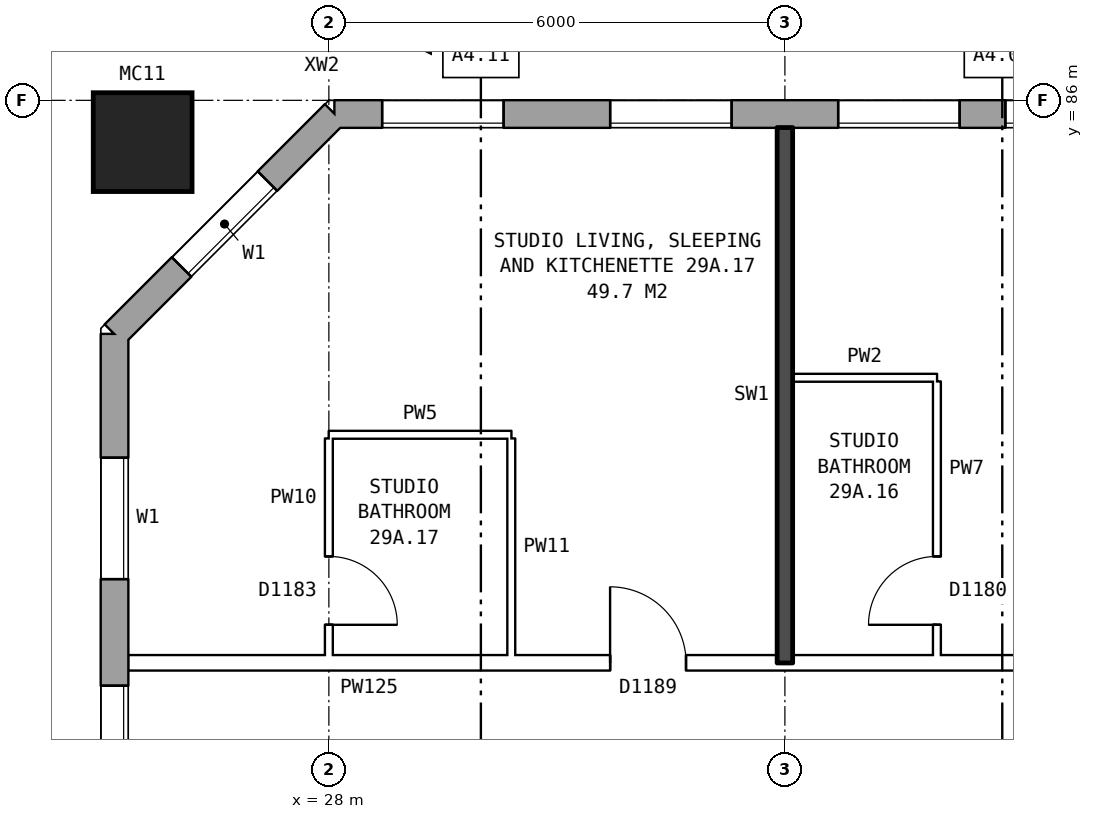
"""IFC4 building model, lengths in metres.
Left out: names, types, materials, properties, quantities, classifications, styles, units other than length and angle.
Written with IfcOpenShell. Run it as: python <this file> out.ifc"""

import sys

from ifc_helpers import new_model, si_unit, direction, frame, frame_2d, origin, origin_2d, place, context, subcontext, project, spatial, rectangle, hollow_rectangle, extrude, element, fill, save


model = new_model("IFC4")
c1 = context("Model", 3, precision=1e-05, world=origin(), true_north=direction((0.0, 1.0)))
c2 = subcontext(c1, "Body", "Model", "MODEL_VIEW")
j1 = project(units=[si_unit("LENGTHUNIT", "METRE"), si_unit("PLANEANGLEUNIT", "RADIAN")], contexts=[c1])
p1 = place(None, origin())
s1 = spatial("IfcSite", under=j1, at=p1, CompositionType="ELEMENT")
p2 = place(p1, origin())
s2 = spatial("IfcBuilding", under=s1, at=p2, CompositionType="ELEMENT")
p3 = place(p2, frame((0.0, 0.0, 105.7)))
s3 = spatial("IfcBuildingStorey", under=s2, at=p3, CompositionType="ELEMENT", Elevation=105.7)
p4 = place(p3, frame((25.55, 85.45, 0.0), z_axis=(0.0, 0.0, 1.0), x_axis=(1.0, 0.0, 0.0)))
e1 = element("IfcColumn", 1, at=p4, inside=s3, PredefinedType="COLUMN", context=c2, shape_type="SweptSolid", body=[
    extrude(hollow_rectangle(XDim=1.3, YDim=1.3, WallThickness=0.07, at=origin_2d()), origin(), (0.0, 0.0, 1.0), 3.1),
])
p5 = place(p3, frame((72.925, 85.82, 0.0), z_axis=(0.0, 0.0, 1.0), x_axis=(-1.0, 0.0, 0.0)))
e2 = element("IfcWall", 2, at=p5, inside=s3, PredefinedType="STANDARD", context=c2, shape_type="SweptSolid", body=[
    extrude(rectangle(XDim=44.851, YDim=0.36, at=frame_2d((22.425, 0.0))), origin(), (0.0, 0.0, 1.0), 2.85),
])
p6 = place(p5, frame((0.625, 0.0, 0.8)))
e3 = element("IfcOpeningElement", 3, at=p6, cuts=e2, PredefinedType="OPENING", context=c2, shape_type="SweptSolid", body=[
    extrude(rectangle(XDim=1.6, YDim=1.8, at=frame_2d((0.8, 0.9))), frame((0.0, 0.19, 0.0), z_axis=(0.0, -1.0, 0.0), x_axis=(1.0, 0.0, 0.0)), (0.0, 0.0, 1.0), 0.38),
])
p7 = place(p5, frame((3.625, 0.0, 0.8)))
e4 = element("IfcOpeningElement", 4, at=p7, cuts=e2, PredefinedType="OPENING", context=c2, shape_type="SweptSolid", body=[
    extrude(rectangle(XDim=1.6, YDim=1.8, at=frame_2d((0.8, 0.9))), frame((0.0, 0.19, 0.0), z_axis=(0.0, -1.0, 0.0), x_axis=(1.0, 0.0, 0.0)), (0.0, 0.0, 1.0), 0.38),
])
p8 = place(p5, frame((6.625, 0.0, 0.8)))
e5 = element("IfcOpeningElement", 5, at=p8, cuts=e2, PredefinedType="OPENING", context=c2, shape_type="SweptSolid", body=[
    extrude(rectangle(XDim=1.6, YDim=1.8, at=frame_2d((0.8, 0.9))), frame((0.0, 0.19, 0.0), z_axis=(0.0, -1.0, 0.0), x_axis=(1.0, 0.0, 0.0)), (0.0, 0.0, 1.0), 0.38),
])
p9 = place(p5, frame((9.125, 0.0, 0.8)))
e6 = element("IfcOpeningElement", 6, at=p9, cuts=e2, PredefinedType="OPENING", context=c2, shape_type="SweptSolid", body=[
    extrude(rectangle(XDim=1.6, YDim=1.8, at=frame_2d((0.8, 0.9))), frame((0.0, 0.19, 0.0), z_axis=(0.0, -1.0, 0.0), x_axis=(1.0, 0.0, 0.0)), (0.0, 0.0, 1.0), 0.38),
])
p10 = place(p5, frame((12.825, 0.0, 0.55)))
e7 = element("IfcOpeningElement", 7, at=p10, cuts=e2, PredefinedType="OPENING", context=c2, shape_type="SweptSolid", body=[
    extrude(rectangle(XDim=0.6, YDim=0.9, at=frame_2d((0.3, 0.45))), frame((0.0, 0.19, 0.0), z_axis=(0.0, -1.0, 0.0), x_axis=(1.0, 0.0, 0.0)), (0.0, 0.0, 1.0), 0.38),
])
p11 = place(p5, frame((15.625, 0.0, 0.8)))
e8 = element("IfcOpeningElement", 8, at=p11, cuts=e2, PredefinedType="OPENING", context=c2, shape_type="SweptSolid", body=[
    extrude(rectangle(XDim=1.6, YDim=1.8, at=frame_2d((0.8, 0.9))), frame((0.0, 0.19, 0.0), z_axis=(0.0, -1.0, 0.0), x_axis=(1.0, 0.0, 0.0)), (0.0, 0.0, 1.0), 0.38),
])
p12 = place(p5, frame((18.625, 0.0, 0.8)))
e9 = element("IfcOpeningElement", 9, at=p12, cuts=e2, PredefinedType="OPENING", context=c2, shape_type="SweptSolid", body=[
    extrude(rectangle(XDim=1.6, YDim=1.8, at=frame_2d((0.8, 0.9))), frame((0.0, 0.19, 0.0), z_axis=(0.0, -1.0, 0.0), x_axis=(1.0, 0.0, 0.0)), (0.0, 0.0, 1.0), 0.38),
])
p13 = place(p5, frame((21.625, 0.0, 0.8)))
e10 = element("IfcOpeningElement", 10, at=p13, cuts=e2, PredefinedType="OPENING", context=c2, shape_type="SweptSolid", body=[
    extrude(rectangle(XDim=1.6, YDim=1.8, at=frame_2d((0.8, 0.9))), frame((0.0, 0.19, 0.0), z_axis=(0.0, -1.0, 0.0), x_axis=(1.0, 0.0, 0.0)), (0.0, 0.0, 1.0), 0.38),
])
p14 = place(p5, frame((24.625, 0.0, 0.8)))
e11 = element("IfcOpeningElement", 11, at=p14, cuts=e2, PredefinedType="OPENING", context=c2, shape_type="SweptSolid", body=[
    extrude(rectangle(XDim=1.6, YDim=1.8, at=frame_2d((0.8, 0.9))), frame((0.0, 0.19, 0.0), z_axis=(0.0, -1.0, 0.0), x_axis=(1.0, 0.0, 0.0)), (0.0, 0.0, 1.0), 0.38),
])
p15 = place(p5, frame((27.625, 0.0, 0.8)))
e12 = element("IfcOpeningElement", 12, at=p15, cuts=e2, PredefinedType="OPENING", context=c2, shape_type="SweptSolid", body=[
    extrude(rectangle(XDim=1.6, YDim=1.8, at=frame_2d((0.8, 0.9))), frame((0.0, 0.19, 0.0), z_axis=(0.0, -1.0, 0.0), x_axis=(1.0, 0.0, 0.0)), (0.0, 0.0, 1.0), 0.38),
])
p16 = place(p5, frame((29.525, 0.0, 0.8)))
e13 = element("IfcOpeningElement", 13, at=p16, cuts=e2, PredefinedType="OPENING", context=c2, shape_type="SweptSolid", body=[
    extrude(rectangle(XDim=0.8, YDim=1.8, at=frame_2d((0.4, 0.9))), frame((0.0, 0.19, 0.0), z_axis=(0.0, -1.0, 0.0), x_axis=(1.0, 0.0, 0.0)), (0.0, 0.0, 1.0), 0.38),
])
p17 = place(p5, frame((33.325, 0.0, 1.4)))
e14 = element("IfcOpeningElement", 14, at=p17, cuts=e2, PredefinedType="OPENING", context=c2, shape_type="SweptSolid", body=[
    extrude(rectangle(XDim=1.0, YDim=1.2, at=frame_2d((0.5, 0.6))), frame((0.0, 0.19, 0.0), z_axis=(0.0, -1.0, 0.0), x_axis=(1.0, 0.0, 0.0)), (0.0, 0.0, 1.0), 0.38),
])
p18 = place(p5, frame((36.625, 0.0, 0.8)))
e15 = element("IfcOpeningElement", 15, at=p18, cuts=e2, PredefinedType="OPENING", context=c2, shape_type="SweptSolid", body=[
    extrude(rectangle(XDim=1.6, YDim=1.8, at=frame_2d((0.8, 0.9))), frame((0.0, 0.19, 0.0), z_axis=(0.0, -1.0, 0.0), x_axis=(1.0, 0.0, 0.0)), (0.0, 0.0, 1.0), 0.38),
])
p19 = place(p5, frame((39.625, 0.0, 0.8)))
e16 = element("IfcOpeningElement", 16, at=p19, cuts=e2, PredefinedType="OPENING", context=c2, shape_type="SweptSolid", body=[
    extrude(rectangle(XDim=1.6, YDim=1.8, at=frame_2d((0.8, 0.9))), frame((0.0, 0.19, 0.0), z_axis=(0.0, -1.0, 0.0), x_axis=(1.0, 0.0, 0.0)), (0.0, 0.0, 1.0), 0.38),
])
p20 = place(p5, frame((42.625, 0.0, 0.8)))
e17 = element("IfcOpeningElement", 17, at=p20, cuts=e2, PredefinedType="OPENING", context=c2, shape_type="SweptSolid", body=[
    extrude(rectangle(XDim=1.6, YDim=1.8, at=frame_2d((0.8, 0.9))), frame((0.0, 0.19, 0.0), z_axis=(0.0, -1.0, 0.0), x_axis=(1.0, 0.0, 0.0)), (0.0, 0.0, 1.0), 0.38),
])
p21 = place(p5, frame((11.025, 0.0, 1.5)))
e18 = element("IfcOpeningElement", 18, at=p21, cuts=e2, PredefinedType="OPENING", context=c2, shape_type="SweptSolid", body=[
    extrude(rectangle(XDim=0.6, YDim=0.9, at=frame_2d((0.3, 0.45))), frame((0.0, 0.19, 0.0), z_axis=(0.0, -1.0, 0.0), x_axis=(1.0, 0.0, 0.0)), (0.0, 0.0, 1.0), 0.38),
])
p22 = place(p5, frame((13.725, 0.0, 0.55)))
e19 = element("IfcOpeningElement", 19, at=p22, cuts=e2, PredefinedType="OPENING", context=c2, shape_type="SweptSolid", body=[
    extrude(rectangle(XDim=1.0, YDim=1.5, at=frame_2d((0.5, 0.75))), frame((0.0, 0.19, 0.0), z_axis=(0.0, -1.0, 0.0), x_axis=(1.0, 0.0, 0.0)), (0.0, 0.0, 1.0), 0.38),
])
p23 = place(p5, frame((30.625, 0.0, 0.8)))
e20 = element("IfcOpeningElement", 20, at=p23, cuts=e2, PredefinedType="OPENING", context=c2, shape_type="SweptSolid", body=[
    extrude(rectangle(XDim=1.0, YDim=0.9, at=frame_2d((0.5, 0.45))), frame((0.0, 0.19, 0.0), z_axis=(0.0, -1.0, 0.0), x_axis=(1.0, 0.0, 0.0)), (0.0, 0.0, 1.0), 0.38),
])
p24 = place(p5, frame((34.625, 0.0, 0.8)))
e21 = element("IfcOpeningElement", 21, at=p24, cuts=e2, PredefinedType="OPENING", context=c2, shape_type="SweptSolid", body=[
    extrude(rectangle(XDim=1.4, YDim=1.8, at=frame_2d((0.7, 0.9))), frame((0.0, 0.19, 0.0), z_axis=(0.0, -1.0, 0.0), x_axis=(1.0, 0.0, 0.0)), (0.0, 0.0, 1.0), 0.38),
])
p25 = place(p3, frame((28.075, 85.82, 0.0), z_axis=(0.0, 0.0, 1.0), x_axis=(-0.707106781187, -0.707106781187, 0.0)))
e22 = element("IfcWall", 22, at=p25, inside=s3, PredefinedType="STANDARD", context=c2, shape_type="SweptSolid", body=[
    extrude(rectangle(XDim=4.094, YDim=0.36, at=frame_2d((2.047, 0.0))), origin(), (0.0, 0.0, 1.0), 2.85),
])
p26 = place(p25, frame((1.247, 0.0, 0.8)))
e23 = element("IfcOpeningElement", 23, at=p26, cuts=e22, PredefinedType="OPENING", context=c2, shape_type="SweptSolid", body=[
    extrude(rectangle(XDim=1.6, YDim=1.8, at=frame_2d((0.8, 0.9))), frame((0.0, 0.19, 0.0), z_axis=(0.0, -1.0, 0.0), x_axis=(1.0, 0.0, 0.0)), (0.0, 0.0, 1.0), 0.38),
])
p27 = place(p3, frame((25.18, 82.925, 0.0), z_axis=(0.0, 0.0, 1.0), x_axis=(0.0, -1.0, 0.0)))
e24 = element("IfcWall", 24, at=p27, inside=s3, PredefinedType="STANDARD", context=c2, shape_type="SweptSolid", body=[
    extrude(rectangle(XDim=25.851, YDim=0.36, at=frame_2d((12.925, 0.0))), origin(), (0.0, 0.0, 1.0), 2.85),
])
p28 = place(p27, frame((1.625, 0.0, 0.8)))
e25 = element("IfcOpeningElement", 25, at=p28, cuts=e24, PredefinedType="OPENING", context=c2, shape_type="SweptSolid", body=[
    extrude(rectangle(XDim=1.6, YDim=1.8, at=frame_2d((0.8, 0.9))), frame((0.0, 0.19, 0.0), z_axis=(0.0, -1.0, 0.0), x_axis=(1.0, 0.0, 0.0)), (0.0, 0.0, 1.0), 0.38),
])
p29 = place(p27, frame((4.625, 0.0, 0.8)))
e26 = element("IfcOpeningElement", 26, at=p29, cuts=e24, PredefinedType="OPENING", context=c2, shape_type="SweptSolid", body=[
    extrude(rectangle(XDim=1.6, YDim=1.8, at=frame_2d((0.8, 0.9))), frame((0.0, 0.19, 0.0), z_axis=(0.0, -1.0, 0.0), x_axis=(1.0, 0.0, 0.0)), (0.0, 0.0, 1.0), 0.38),
])
p30 = place(p27, frame((6.525, 0.0, 0.8)))
e27 = element("IfcOpeningElement", 27, at=p30, cuts=e24, PredefinedType="OPENING", context=c2, shape_type="SweptSolid", body=[
    extrude(rectangle(XDim=1.6, YDim=1.5, at=frame_2d((0.8, 0.75))), frame((0.0, 0.19, 0.0), z_axis=(0.0, -1.0, 0.0), x_axis=(1.0, 0.0, 0.0)), (0.0, 0.0, 1.0), 0.38),
])
p31 = place(p27, frame((8.425, 0.0, 0.8)))
e28 = element("IfcOpeningElement", 28, at=p31, cuts=e24, PredefinedType="OPENING", context=c2, shape_type="SweptSolid", body=[
    extrude(rectangle(XDim=0.6, YDim=0.9, at=frame_2d((0.3, 0.45))), frame((0.0, 0.19, 0.0), z_axis=(0.0, -1.0, 0.0), x_axis=(1.0, 0.0, 0.0)), (0.0, 0.0, 1.0), 0.38),
])
p32 = place(p27, frame((10.275, 0.0, 1.7)))
e29 = element("IfcOpeningElement", 29, at=p32, cuts=e24, PredefinedType="OPENING", context=c2, shape_type="SweptSolid", body=[
    extrude(rectangle(XDim=0.8, YDim=0.9, at=frame_2d((0.4, 0.45))), frame((0.0, 0.19, 0.0), z_axis=(0.0, -1.0, 0.0), x_axis=(1.0, 0.0, 0.0)), (0.0, 0.0, 1.0), 0.38),
])
p33 = place(p27, frame((11.375, 0.0, 1.1)))
e30 = element("IfcOpeningElement", 30, at=p33, cuts=e24, PredefinedType="OPENING", context=c2, shape_type="SweptSolid", body=[
    extrude(rectangle(XDim=0.8, YDim=1.5, at=frame_2d((0.4, 0.75))), frame((0.0, 0.19, 0.0), z_axis=(0.0, -1.0, 0.0), x_axis=(1.0, 0.0, 0.0)), (0.0, 0.0, 1.0), 0.38),
])
p34 = place(p27, frame((19.625, 0.0, 0.8)))
e31 = element("IfcOpeningElement", 31, at=p34, cuts=e24, PredefinedType="OPENING", context=c2, shape_type="SweptSolid", body=[
    extrude(rectangle(XDim=1.6, YDim=1.8, at=frame_2d((0.8, 0.9))), frame((0.0, 0.19, 0.0), z_axis=(0.0, -1.0, 0.0), x_axis=(1.0, 0.0, 0.0)), (0.0, 0.0, 1.0), 0.38),
])
p35 = place(p27, frame((22.625, 0.0, 0.8)))
e32 = element("IfcOpeningElement", 32, at=p35, cuts=e24, PredefinedType="OPENING", context=c2, shape_type="SweptSolid", body=[
    extrude(rectangle(XDim=1.6, YDim=1.8, at=frame_2d((0.8, 0.9))), frame((0.0, 0.19, 0.0), z_axis=(0.0, -1.0, 0.0), x_axis=(1.0, 0.0, 0.0)), (0.0, 0.0, 1.0), 0.38),
])
p36 = place(p27, frame((12.475, 0.0, 0.8)))
e33 = element("IfcOpeningElement", 33, at=p36, cuts=e24, PredefinedType="OPENING", context=c2, shape_type="SweptSolid", body=[
    extrude(rectangle(XDim=1.6, YDim=1.8, at=frame_2d((0.8, 0.9))), frame((0.0, 0.19, 0.0), z_axis=(0.0, -1.0, 0.0), x_axis=(1.0, 0.0, 0.0)), (0.0, 0.0, 1.0), 0.38),
])
p37 = place(p27, frame((14.375, 0.0, 1.7)))
e34 = element("IfcOpeningElement", 34, at=p37, cuts=e24, PredefinedType="OPENING", context=c2, shape_type="SweptSolid", body=[
    extrude(rectangle(XDim=1.2, YDim=0.9, at=frame_2d((0.6, 0.45))), frame((0.0, 0.19, 0.0), z_axis=(0.0, -1.0, 0.0), x_axis=(1.0, 0.0, 0.0)), (0.0, 0.0, 1.0), 0.38),
])
p38 = place(p27, frame((16.725, 0.0, 0.8)))
e35 = element("IfcOpeningElement", 35, at=p38, cuts=e24, PredefinedType="OPENING", context=c2, shape_type="SweptSolid", body=[
    extrude(rectangle(XDim=0.6, YDim=0.9, at=frame_2d((0.3, 0.45))), frame((0.0, 0.19, 0.0), z_axis=(0.0, -1.0, 0.0), x_axis=(1.0, 0.0, 0.0)), (0.0, 0.0, 1.0), 0.38),
])
p39 = place(p27, frame((17.725, 0.0, 0.8)))
e36 = element("IfcOpeningElement", 36, at=p39, cuts=e24, PredefinedType="OPENING", context=c2, shape_type="SweptSolid", body=[
    extrude(rectangle(XDim=1.6, YDim=1.5, at=frame_2d((0.8, 0.75))), frame((0.0, 0.19, 0.0), z_axis=(0.0, -1.0, 0.0), x_axis=(1.0, 0.0, 0.0)), (0.0, 0.0, 1.0), 0.38),
])
p40 = place(p3, frame((25.36, 78.6, 0.0), z_axis=(0.0, 0.0, 1.0), x_axis=(1.0, 0.0, 0.0)))
e37 = element("IfcWall", 37, at=p40, inside=s3, PredefinedType="PARTITIONING", context=c2, shape_type="SweptSolid", body=[
    extrude(rectangle(XDim=20.54, YDim=0.2, at=frame_2d((10.27, 0.0))), origin(), (0.0, 0.0, 1.0), 2.85),
])
p41 = place(p40, frame((18.09, 0.0, 0.0)))
e38 = element("IfcOpeningElement", 38, at=p41, cuts=e37, PredefinedType="OPENING", context=c2, shape_type="SweptSolid", body=[
    extrude(rectangle(XDim=1.0, YDim=2.1, at=frame_2d((0.5, 1.05))), frame((0.0, 0.11, 0.0), z_axis=(0.0, -1.0, 0.0), x_axis=(1.0, 0.0, 0.0)), (0.0, 0.0, 1.0), 0.22),
])
p42 = place(p40, frame((12.14, 0.0, 0.0)))
e39 = element("IfcOpeningElement", 39, at=p42, cuts=e37, PredefinedType="OPENING", context=c2, shape_type="SweptSolid", body=[
    extrude(rectangle(XDim=1.0, YDim=2.1, at=frame_2d((0.5, 1.05))), frame((0.0, 0.11, 0.0), z_axis=(0.0, -1.0, 0.0), x_axis=(1.0, 0.0, 0.0)), (0.0, 0.0, 1.0), 0.22),
])
p43 = place(p40, frame((6.34, 0.0, 0.0)))
e40 = element("IfcOpeningElement", 40, at=p43, cuts=e37, PredefinedType="OPENING", context=c2, shape_type="SweptSolid", body=[
    extrude(rectangle(XDim=1.0, YDim=2.1, at=frame_2d((0.5, 1.05))), frame((0.0, 0.11, 0.0), z_axis=(0.0, -1.0, 0.0), x_axis=(1.0, 0.0, 0.0)), (0.0, 0.0, 1.0), 0.22),
])
p44 = place(p3, frame((28.0, 81.6, 0.0), z_axis=(0.0, 0.0, 1.0), x_axis=(1.0, 0.0, 0.0)))
e41 = element("IfcWall", 41, at=p44, inside=s3, PredefinedType="PARTITIONING", context=c2, shape_type="SweptSolid", body=[
    extrude(rectangle(XDim=2.4, YDim=0.1, at=frame_2d((1.2, 0.0))), origin(), (0.0, 0.0, 1.0), 2.85),
])
p45 = place(p3, frame((34.1, 82.35, 0.0), z_axis=(0.0, 0.0, 1.0), x_axis=(1.0, 0.0, 0.0)))
e42 = element("IfcWall", 42, at=p45, inside=s3, PredefinedType="PARTITIONING", context=c2, shape_type="SweptSolid", body=[
    extrude(rectangle(XDim=1.9, YDim=0.1, at=frame_2d((0.95, 0.0))), origin(), (0.0, 0.0, 1.0), 2.85),
])
p46 = place(p3, frame((28.0, 78.7, 0.0), z_axis=(0.0, 0.0, 1.0), x_axis=(0.0, 1.0, 0.0)))
e43 = element("IfcWall", 43, at=p46, inside=s3, PredefinedType="PARTITIONING", context=c2, shape_type="SweptSolid", body=[
    extrude(rectangle(XDim=2.85, YDim=0.1, at=frame_2d((1.425, 0.0))), origin(), (0.0, 0.0, 1.0), 2.85),
])
p47 = place(p46, frame((0.4, 0.0, 0.0)))
e44 = element("IfcOpeningElement", 44, at=p47, cuts=e43, PredefinedType="OPENING", context=c2, shape_type="SweptSolid", body=[
    extrude(rectangle(XDim=0.9, YDim=2.1, at=frame_2d((0.45, 1.05))), frame((0.0, 0.06, 0.0), z_axis=(0.0, -1.0, 0.0), x_axis=(1.0, 0.0, 0.0)), (0.0, 0.0, 1.0), 0.12),
])
p48 = place(p3, frame((30.4, 78.7, 0.0), z_axis=(0.0, 0.0, 1.0), x_axis=(0.0, 1.0, 0.0)))
e45 = element("IfcWall", 45, at=p48, inside=s3, PredefinedType="PARTITIONING", context=c2, shape_type="SweptSolid", body=[
    extrude(rectangle(XDim=2.85, YDim=0.1, at=frame_2d((1.425, 0.0))), origin(), (0.0, 0.0, 1.0), 2.85),
])
p49 = place(p3, frame((34.0, 78.6, 0.0), z_axis=(0.0, 0.0, 1.0), x_axis=(0.0, 1.0, 0.0)))
e46 = element("IfcWall", 46, at=p49, inside=s3, PredefinedType="SOLIDWALL", context=c2, shape_type="SweptSolid", body=[
    extrude(rectangle(XDim=7.04, YDim=0.2, at=frame_2d((3.52, 0.0))), origin(), (0.0, 0.0, 1.0), 2.85),
])
p50 = place(p3, frame((36.0, 78.7, 0.0), z_axis=(0.0, 0.0, 1.0), x_axis=(0.0, 1.0, 0.0)))
e47 = element("IfcWall", 47, at=p50, inside=s3, PredefinedType="PARTITIONING", context=c2, shape_type="SweptSolid", body=[
    extrude(rectangle(XDim=3.6, YDim=0.1, at=frame_2d((1.8, 0.0))), origin(), (0.0, 0.0, 1.0), 2.85),
])
p51 = place(p50, frame((0.4, 0.0, 0.0)))
e48 = element("IfcOpeningElement", 48, at=p51, cuts=e47, PredefinedType="OPENING", context=c2, shape_type="SweptSolid", body=[
    extrude(rectangle(XDim=0.9, YDim=2.1, at=frame_2d((0.45, 1.05))), frame((0.0, 0.06, 0.0), z_axis=(0.0, -1.0, 0.0), x_axis=(1.0, 0.0, 0.0)), (0.0, 0.0, 1.0), 0.12),
])
p52 = place(p18, origin())
e49 = element("IfcWindow", 49, at=p52, inside=s3, PartitioningType="SINGLE_PANEL", PredefinedType="WINDOW", context=c2, shape_type="SweptSolid", body=[
    extrude(rectangle(XDim=1.6, YDim=1.8, at=frame_2d((0.8, 0.9))), frame((0.0, 0.15, 0.0), z_axis=(0.0, -1.0, 0.0), x_axis=(1.0, 0.0, 0.0)), (0.0, 0.0, 1.0), 0.06),
])
fill(e15, e49)
p53 = place(p19, origin())
e50 = element("IfcWindow", 50, at=p53, inside=s3, PartitioningType="SINGLE_PANEL", PredefinedType="WINDOW", context=c2, shape_type="SweptSolid", body=[
    extrude(rectangle(XDim=1.6, YDim=1.8, at=frame_2d((0.8, 0.9))), frame((0.0, 0.15, 0.0), z_axis=(0.0, -1.0, 0.0), x_axis=(1.0, 0.0, 0.0)), (0.0, 0.0, 1.0), 0.06),
])
fill(e16, e50)
p54 = place(p20, origin())
e51 = element("IfcWindow", 51, at=p54, inside=s3, PartitioningType="SINGLE_PANEL", PredefinedType="WINDOW", context=c2, shape_type="SweptSolid", body=[
    extrude(rectangle(XDim=1.6, YDim=1.8, at=frame_2d((0.8, 0.9))), frame((0.0, 0.15, 0.0), z_axis=(0.0, -1.0, 0.0), x_axis=(1.0, 0.0, 0.0)), (0.0, 0.0, 1.0), 0.06),
])
fill(e17, e51)
p55 = place(p26, origin())
e52 = element("IfcWindow", 52, at=p55, inside=s3, PartitioningType="SINGLE_PANEL", PredefinedType="WINDOW", context=c2, shape_type="SweptSolid", body=[
    extrude(rectangle(XDim=1.6, YDim=1.8, at=frame_2d((0.8, 0.9))), frame((0.0, 0.15, 0.0), z_axis=(0.0, -1.0, 0.0), x_axis=(1.0, 0.0, 0.0)), (0.0, 0.0, 1.0), 0.06),
])
fill(e23, e52)
p56 = place(p28, origin())
e53 = element("IfcWindow", 53, at=p56, inside=s3, PartitioningType="SINGLE_PANEL", PredefinedType="WINDOW", context=c2, shape_type="SweptSolid", body=[
    extrude(rectangle(XDim=1.6, YDim=1.8, at=frame_2d((0.8, 0.9))), frame((0.0, 0.15, 0.0), z_axis=(0.0, -1.0, 0.0), x_axis=(1.0, 0.0, 0.0)), (0.0, 0.0, 1.0), 0.06),
])
fill(e25, e53)
p57 = place(p29, origin())
e54 = element("IfcWindow", 54, at=p57, inside=s3, PartitioningType="SINGLE_PANEL", PredefinedType="WINDOW", context=c2, shape_type="SweptSolid", body=[
    extrude(rectangle(XDim=1.6, YDim=1.8, at=frame_2d((0.8, 0.9))), frame((0.0, 0.15, 0.0), z_axis=(0.0, -1.0, 0.0), x_axis=(1.0, 0.0, 0.0)), (0.0, 0.0, 1.0), 0.06),
])
fill(e26, e54)
p58 = place(p51, origin())
e55 = element("IfcDoor", 55, at=p58, inside=s3, OperationType="SINGLE_SWING_LEFT", PredefinedType="DOOR", context=c2, shape_type="SweptSolid", body=[
    extrude(rectangle(XDim=0.9, YDim=2.1, at=frame_2d((0.45, 1.05))), frame((0.0, 0.025, 0.0), z_axis=(0.0, -1.0, 0.0), x_axis=(1.0, 0.0, 0.0)), (0.0, 0.0, 1.0), 0.05),
])
fill(e48, e55)
p59 = place(p43, origin())
e56 = element("IfcDoor", 56, at=p59, inside=s3, OperationType="SINGLE_SWING_LEFT", PredefinedType="DOOR", context=c2, shape_type="SweptSolid", body=[
    extrude(rectangle(XDim=1.0, YDim=2.1, at=frame_2d((0.5, 1.05))), frame((0.0, 0.025, 0.0), z_axis=(0.0, -1.0, 0.0), x_axis=(1.0, 0.0, 0.0)), (0.0, 0.0, 1.0), 0.05),
])
fill(e40, e56)
p60 = place(p47, frame((0.9, 0.0, 0.0), z_axis=(0.0, 0.0, 1.0), x_axis=(-1.0, 0.0, 0.0)))
e57 = element("IfcDoor", 57, at=p60, inside=s3, OperationType="SINGLE_SWING_RIGHT", PredefinedType="DOOR", context=c2, shape_type="SweptSolid", body=[
    extrude(rectangle(XDim=0.9, YDim=2.1, at=frame_2d((0.45, 1.05))), frame((0.0, 0.025, 0.0), z_axis=(0.0, -1.0, 0.0), x_axis=(1.0, 0.0, 0.0)), (0.0, 0.0, 1.0), 0.05),
])
fill(e44, e57)
p61 = place(p24, origin())
e58 = element("IfcWindow", 58, at=p61, inside=s3, PartitioningType="SINGLE_PANEL", PredefinedType="WINDOW", context=c2, shape_type="SweptSolid", body=[
    extrude(rectangle(XDim=1.4, YDim=1.8, at=frame_2d((0.7, 0.9))), frame((0.0, 0.15, 0.0), z_axis=(0.0, -1.0, 0.0), x_axis=(1.0, 0.0, 0.0)), (0.0, 0.0, 1.0), 0.06),
])
fill(e21, e58)
save(model, sys.argv[1])
